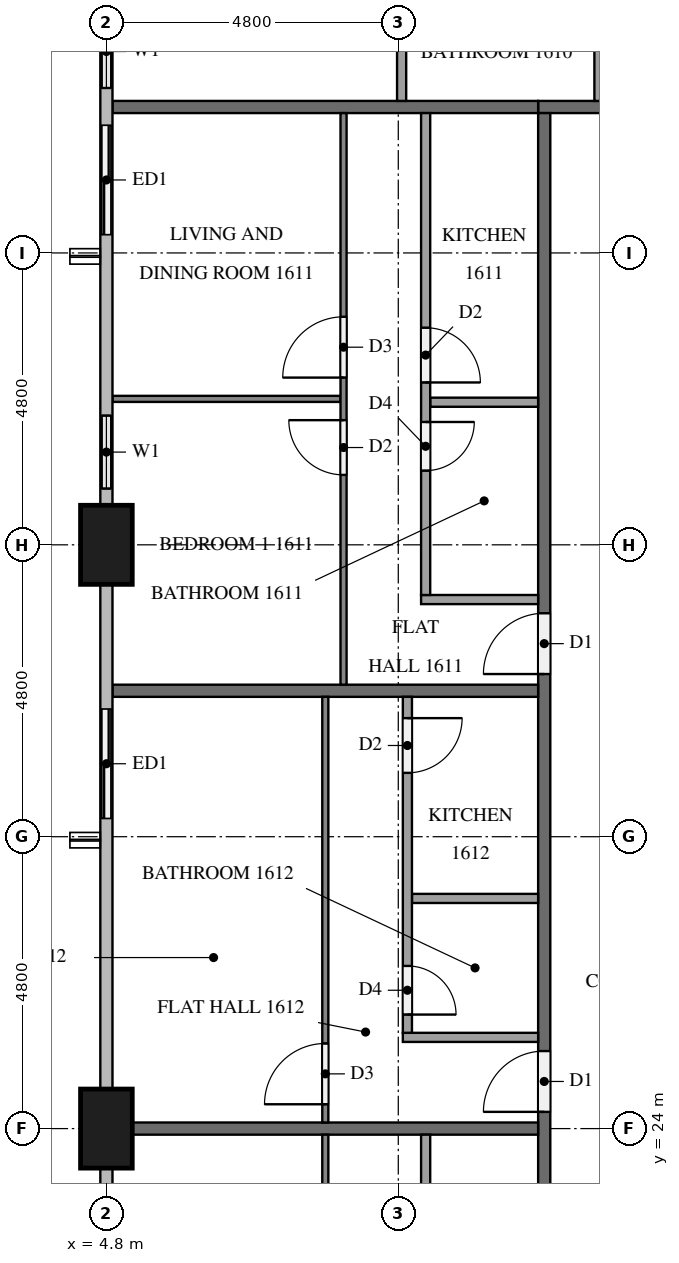
"""IFC4 building model, lengths in metres.
Left out: names, types, materials, properties, quantities, classifications, styles, units other than length and angle.
Written with IfcOpenShell. Run it as: python <this file> out.ifc"""

import sys

from ifc_helpers import new_model, si_unit, direction, frame, frame_2d, origin, origin_2d, place, context, subcontext, project, spatial, rectangle, extrude, element, fill, save


model = new_model("IFC4")
c1 = context("Model", 3, precision=1e-05, world=origin(), true_north=direction((0.0, 1.0)))
c2 = subcontext(c1, "Body", "Model", "MODEL_VIEW")
j1 = project(units=[si_unit("LENGTHUNIT", "METRE"), si_unit("PLANEANGLEUNIT", "RADIAN")], contexts=[c1])
p1 = place(None, origin())
s1 = spatial("IfcSite", under=j1, at=p1, CompositionType="ELEMENT")
p2 = place(p1, origin())
s2 = spatial("IfcBuilding", under=s1, at=p2, CompositionType="ELEMENT")
p3 = place(p2, frame((0.0, 0.0, 66.3)))
s3 = spatial("IfcBuildingStorey", under=s2, at=p3, CompositionType="ELEMENT", Elevation=66.3)
for number, where, z_axis, x_axis in (
    (1, (4.8, 33.6, 0.0), (0.0, 0.0, 1.0), (0.0, 1.0, 0.0)),
    (2, (4.8, 24.0, 0.0), (0.0, 0.0, 1.0), (0.0, 1.0, 0.0)),
):
    element("IfcColumn", number, at=place(p3, frame(where, z_axis=z_axis, x_axis=x_axis)), inside=s3, PredefinedType="COLUMN", context=c2, shape_type="SweptSolid", body=[
        extrude(rectangle(XDim=1.3, YDim=0.85, at=origin_2d()), origin(), (0.0, 0.0, 1.0), 3.2),
    ])
p4 = place(p3, frame((4.8, 42.625, 0.0), z_axis=(0.0, 0.0, 1.0), x_axis=(0.0, -1.0, 0.0)))
e3 = element("IfcWall", 3, at=p4, inside=s3, PredefinedType="SOLIDWALL", context=c2, shape_type="SweptSolid", body=[
    extrude(rectangle(XDim=4.225, YDim=0.15, at=frame_2d((2.113, 0.0))), origin(), (0.0, 0.0, 1.0), 3.2),
])
p5 = place(p4, frame((0.312, 0.0, 0.9)))
e4 = element("IfcOpeningElement", 4, at=p5, cuts=e3, PredefinedType="OPENING", context=c2, shape_type="SweptSolid", body=[
    extrude(rectangle(XDim=1.2, YDim=1.4, at=frame_2d((0.6, 0.7))), frame((0.0, 0.085, 0.0), z_axis=(0.0, -1.0, 0.0), x_axis=(1.0, 0.0, 0.0)), (0.0, 0.0, 1.0), 0.17),
])
p6 = place(p4, frame((2.125, 0.0, 0.0)))
e5 = element("IfcOpeningElement", 5, at=p6, cuts=e3, PredefinedType="OPENING", context=c2, shape_type="SweptSolid", body=[
    extrude(rectangle(XDim=1.8, YDim=2.4, at=frame_2d((0.9, 1.2))), frame((0.0, 0.085, 0.0), z_axis=(0.0, -1.0, 0.0), x_axis=(1.0, 0.0, 0.0)), (0.0, 0.0, 1.0), 0.17),
])
p7 = place(p3, frame((4.8, 36.0, 0.0), z_axis=(0.0, 0.0, 1.0), x_axis=(0.0, -1.0, 0.0)))
e6 = element("IfcWall", 6, at=p7, inside=s3, PredefinedType="SOLIDWALL", context=c2, shape_type="SweptSolid", body=[
    extrude(rectangle(XDim=1.75, YDim=0.15, at=frame_2d((0.875, 0.0))), origin(), (0.0, 0.0, 1.0), 3.2),
])
p8 = place(p7, frame((0.275, 0.0, 0.9)))
e7 = element("IfcOpeningElement", 7, at=p8, cuts=e6, PredefinedType="OPENING", context=c2, shape_type="SweptSolid", body=[
    extrude(rectangle(XDim=1.2, YDim=1.4, at=frame_2d((0.6, 0.7))), frame((0.0, 0.085, 0.0), z_axis=(0.0, -1.0, 0.0), x_axis=(1.0, 0.0, 0.0)), (0.0, 0.0, 1.0), 0.17),
])
p9 = place(p3, frame((4.8, 31.2, 0.0), z_axis=(0.0, 0.0, 1.0), x_axis=(0.0, -1.0, 0.0)))
e8 = element("IfcWall", 8, at=p9, inside=s3, PredefinedType="SOLIDWALL", context=c2, shape_type="SweptSolid", body=[
    extrude(rectangle(XDim=2.4, YDim=0.15, at=frame_2d((1.2, 0.0))), origin(), (0.0, 0.0, 1.0), 3.2),
])
p10 = place(p9, frame((0.3, 0.0, 0.0)))
e9 = element("IfcOpeningElement", 9, at=p10, cuts=e8, PredefinedType="OPENING", context=c2, shape_type="SweptSolid", body=[
    extrude(rectangle(XDim=1.8, YDim=2.4, at=frame_2d((0.9, 1.2))), frame((0.0, 0.085, 0.0), z_axis=(0.0, -1.0, 0.0), x_axis=(1.0, 0.0, 0.0)), (0.0, 0.0, 1.0), 0.17),
])
p11 = place(p3, frame((4.8, 23.35, 0.0), z_axis=(0.0, 0.0, 1.0), x_axis=(0.0, -1.0, 0.0)))
e10 = element("IfcWall", 10, at=p11, inside=s3, PredefinedType="SOLIDWALL", context=c2, shape_type="SweptSolid", body=[
    extrude(rectangle(XDim=1.75, YDim=0.15, at=frame_2d((0.875, 0.0))), origin(), (0.0, 0.0, 1.0), 3.2),
])
p12 = place(p11, frame((0.275, 0.0, 0.9)))
e11 = element("IfcOpeningElement", 11, at=p12, cuts=e10, PredefinedType="OPENING", context=c2, shape_type="SweptSolid", body=[
    extrude(rectangle(XDim=1.2, YDim=1.4, at=frame_2d((0.6, 0.7))), frame((0.0, 0.085, 0.0), z_axis=(0.0, -1.0, 0.0), x_axis=(1.0, 0.0, 0.0)), (0.0, 0.0, 1.0), 0.17),
])
p13 = place(p3, frame((11.9, 40.8, 0.0), z_axis=(0.0, 0.0, 1.0), x_axis=(1.0, 0.0, 0.0)))
e12 = element("IfcWall", 12, at=p13, inside=s3, PredefinedType="PARTITIONING", context=c2, shape_type="SweptSolid", body=[
    extrude(rectangle(XDim=38.6, YDim=0.2, at=frame_2d((19.3, 0.0))), origin(), (0.0, 0.0, 1.0), 3.2),
])
p14 = place(p13, frame((36.375, 0.0, 0.0)))
e13 = element("IfcOpeningElement", 13, at=p14, cuts=e12, PredefinedType="OPENING", context=c2, shape_type="SweptSolid", body=[
    extrude(rectangle(XDim=1.0, YDim=2.1, at=frame_2d((0.5, 1.05))), frame((0.0, 0.11, 0.0), z_axis=(0.0, -1.0, 0.0), x_axis=(1.0, 0.0, 0.0)), (0.0, 0.0, 1.0), 0.22),
])
p15 = place(p13, frame((17.125, 0.0, 0.0)))
e14 = element("IfcOpeningElement", 14, at=p15, cuts=e12, PredefinedType="OPENING", context=c2, shape_type="SweptSolid", body=[
    extrude(rectangle(XDim=1.1, YDim=2.1, at=frame_2d((0.55, 1.05))), frame((0.0, 0.11, 0.0), z_axis=(0.0, -1.0, 0.0), x_axis=(1.0, 0.0, 0.0)), (0.0, 0.0, 1.0), 0.22),
])
p16 = place(p13, frame((15.625, 0.0, 0.0)))
e15 = element("IfcOpeningElement", 15, at=p16, cuts=e12, PredefinedType="OPENING", context=c2, shape_type="SweptSolid", body=[
    extrude(rectangle(XDim=1.0, YDim=2.1, at=frame_2d((0.5, 1.05))), frame((0.0, 0.11, 0.0), z_axis=(0.0, -1.0, 0.0), x_axis=(1.0, 0.0, 0.0)), (0.0, 0.0, 1.0), 0.22),
])
p17 = place(p13, frame((1.225, 0.0, 0.0)))
e16 = element("IfcOpeningElement", 16, at=p17, cuts=e12, PredefinedType="OPENING", context=c2, shape_type="SweptSolid", body=[
    extrude(rectangle(XDim=1.0, YDim=2.1, at=frame_2d((0.5, 1.05))), frame((0.0, 0.11, 0.0), z_axis=(0.0, -1.0, 0.0), x_axis=(1.0, 0.0, 0.0)), (0.0, 0.0, 1.0), 0.22),
])
p18 = place(p3, frame((12.0, 12.1, 0.0), z_axis=(0.0, 0.0, 1.0), x_axis=(0.0, 1.0, 0.0)))
e17 = element("IfcWall", 17, at=p18, inside=s3, PredefinedType="PARTITIONING", context=c2, shape_type="SweptSolid", body=[
    extrude(rectangle(XDim=28.6, YDim=0.2, at=frame_2d((14.3, 0.0))), origin(), (0.0, 0.0, 1.0), 3.2),
])
p19 = place(p18, frame((19.375, 0.0, 0.0)))
e18 = element("IfcOpeningElement", 18, at=p19, cuts=e17, PredefinedType="OPENING", context=c2, shape_type="SweptSolid", body=[
    extrude(rectangle(XDim=1.0, YDim=2.1, at=frame_2d((0.5, 1.05))), frame((0.0, 0.11, 0.0), z_axis=(0.0, -1.0, 0.0), x_axis=(1.0, 0.0, 0.0)), (0.0, 0.0, 1.0), 0.22),
])
p20 = place(p18, frame((12.175, 0.0, 0.0)))
e19 = element("IfcOpeningElement", 19, at=p20, cuts=e17, PredefinedType="OPENING", context=c2, shape_type="SweptSolid", body=[
    extrude(rectangle(XDim=1.0, YDim=2.1, at=frame_2d((0.5, 1.05))), frame((0.0, 0.11, 0.0), z_axis=(0.0, -1.0, 0.0), x_axis=(1.0, 0.0, 0.0)), (0.0, 0.0, 1.0), 0.22),
])
p21 = place(p18, frame((2.575, 0.0, 0.0)))
e20 = element("IfcOpeningElement", 20, at=p21, cuts=e17, PredefinedType="OPENING", context=c2, shape_type="SweptSolid", body=[
    extrude(rectangle(XDim=1.0, YDim=2.1, at=frame_2d((0.5, 1.05))), frame((0.0, 0.11, 0.0), z_axis=(0.0, -1.0, 0.0), x_axis=(1.0, 0.0, 0.0)), (0.0, 0.0, 1.0), 0.22),
])
p22 = place(p18, frame((1.025, 0.0, 0.0)))
e21 = element("IfcOpeningElement", 21, at=p22, cuts=e17, PredefinedType="OPENING", context=c2, shape_type="SweptSolid", body=[
    extrude(rectangle(XDim=1.0, YDim=2.1, at=frame_2d((0.5, 1.05))), frame((0.0, 0.11, 0.0), z_axis=(0.0, -1.0, 0.0), x_axis=(1.0, 0.0, 0.0)), (0.0, 0.0, 1.0), 0.22),
])
for number, where, z_axis, x_axis in (
    (22, (4.9, 40.8, 0.0), (0.0, 0.0, 1.0), (1.0, 0.0, 0.0)),
    (23, (4.9, 31.2, 0.0), (0.0, 0.0, 1.0), (1.0, 0.0, 0.0)),
):
    element("IfcWall", number, at=place(p3, frame(where, z_axis=z_axis, x_axis=x_axis)), inside=s3, PredefinedType="PARTITIONING", context=c2, shape_type="SweptSolid", body=[
        extrude(rectangle(XDim=7.0, YDim=0.2, at=frame_2d((3.5, 0.0))), origin(), (0.0, 0.0, 1.0), 3.2),
    ])
p23 = place(p3, frame((5.225, 24.0, 0.0), z_axis=(0.0, 0.0, 1.0), x_axis=(1.0, 0.0, 0.0)))
e24 = element("IfcWall", 24, at=p23, inside=s3, PredefinedType="PARTITIONING", context=c2, shape_type="SweptSolid", body=[
    extrude(rectangle(XDim=6.675, YDim=0.2, at=frame_2d((3.337, 0.0))), origin(), (0.0, 0.0, 1.0), 3.2),
])
p24 = place(p3, frame((9.655, 40.9, 0.0), z_axis=(0.0, 0.0, 1.0), x_axis=(0.0, 1.0, 0.0)))
e25 = element("IfcWall", 25, at=p24, inside=s3, PredefinedType="PARTITIONING", context=c2, shape_type="SweptSolid", body=[
    extrude(rectangle(XDim=1.775, YDim=0.15, at=frame_2d((0.888, 0.0))), origin(), (0.0, 0.0, 1.0), 3.2),
])
p25 = place(p3, frame((12.9, 40.9, 0.0), z_axis=(0.0, 0.0, 1.0), x_axis=(0.0, 1.0, 0.0)))
e26 = element("IfcWall", 26, at=p25, inside=s3, PredefinedType="PARTITIONING", context=c2, shape_type="SweptSolid", body=[
    extrude(rectangle(XDim=1.925, YDim=0.15, at=frame_2d((0.962, 0.0))), origin(), (0.0, 0.0, 1.0), 3.2),
])
p26 = place(p3, frame((8.65, 36.0, 0.0), z_axis=(0.0, 0.0, 1.0), x_axis=(-1.0, 0.0, 0.0)))
e27 = element("IfcWall", 27, at=p26, inside=s3, PredefinedType="PARTITIONING", context=c2, shape_type="SweptSolid", body=[
    extrude(rectangle(XDim=3.75, YDim=0.1, at=frame_2d((1.875, 0.0))), origin(), (0.0, 0.0, 1.0), 3.2),
])
p27 = place(p3, frame((8.7, 31.3, 0.0), z_axis=(0.0, 0.0, 1.0), x_axis=(0.0, 1.0, 0.0)))
e28 = element("IfcWall", 28, at=p27, inside=s3, PredefinedType="PARTITIONING", context=c2, shape_type="SweptSolid", body=[
    extrude(rectangle(XDim=9.4, YDim=0.1, at=frame_2d((4.7, 0.0))), origin(), (0.0, 0.0, 1.0), 3.2),
])
p28 = place(p27, frame((3.45, 0.0, 0.0)))
e29 = element("IfcOpeningElement", 29, at=p28, cuts=e28, PredefinedType="OPENING", context=c2, shape_type="SweptSolid", body=[
    extrude(rectangle(XDim=0.9, YDim=2.1, at=frame_2d((0.45, 1.05))), frame((0.0, 0.06, 0.0), z_axis=(0.0, -1.0, 0.0), x_axis=(1.0, 0.0, 0.0)), (0.0, 0.0, 1.0), 0.12),
])
p29 = place(p27, frame((5.05, 0.0, 0.0)))
e30 = element("IfcOpeningElement", 30, at=p29, cuts=e28, PredefinedType="OPENING", context=c2, shape_type="SweptSolid", body=[
    extrude(rectangle(XDim=1.0, YDim=2.1, at=frame_2d((0.5, 1.05))), frame((0.0, 0.06, 0.0), z_axis=(0.0, -1.0, 0.0), x_axis=(1.0, 0.0, 0.0)), (0.0, 0.0, 1.0), 0.12),
])
p30 = place(p3, frame((11.9, 35.945, 0.0), z_axis=(0.0, 0.0, 1.0), x_axis=(-1.0, 0.0, 0.0)))
e31 = element("IfcWall", 31, at=p30, inside=s3, PredefinedType="PARTITIONING", context=c2, shape_type="SweptSolid", body=[
    extrude(rectangle(XDim=1.775, YDim=0.15, at=frame_2d((0.887, 0.0))), origin(), (0.0, 0.0, 1.0), 3.2),
])
p31 = place(p3, frame((11.9, 32.7, 0.0), z_axis=(0.0, 0.0, 1.0), x_axis=(-1.0, 0.0, 0.0)))
e32 = element("IfcWall", 32, at=p31, inside=s3, PredefinedType="PARTITIONING", context=c2, shape_type="SweptSolid", body=[
    extrude(rectangle(XDim=1.925, YDim=0.15, at=frame_2d((0.962, 0.0))), origin(), (0.0, 0.0, 1.0), 3.2),
])
p32 = place(p3, frame((10.05, 40.7, 0.0), z_axis=(0.0, 0.0, 1.0), x_axis=(0.0, -1.0, 0.0)))
e33 = element("IfcWall", 33, at=p32, inside=s3, PredefinedType="PARTITIONING", context=c2, shape_type="SweptSolid", body=[
    extrude(rectangle(XDim=7.925, YDim=0.15, at=frame_2d((3.962, 0.0))), origin(), (0.0, 0.0, 1.0), 3.2),
])
p33 = place(p32, frame((5.08, 0.0, 0.0)))
e34 = element("IfcOpeningElement", 34, at=p33, cuts=e33, PredefinedType="OPENING", context=c2, shape_type="SweptSolid", body=[
    extrude(rectangle(XDim=0.8, YDim=2.1, at=frame_2d((0.4, 1.05))), frame((0.0, 0.085, 0.0), z_axis=(0.0, -1.0, 0.0), x_axis=(1.0, 0.0, 0.0)), (0.0, 0.0, 1.0), 0.17),
])
p34 = place(p32, frame((3.53, 0.0, 0.0)))
e35 = element("IfcOpeningElement", 35, at=p34, cuts=e33, PredefinedType="OPENING", context=c2, shape_type="SweptSolid", body=[
    extrude(rectangle(XDim=0.9, YDim=2.1, at=frame_2d((0.45, 1.05))), frame((0.0, 0.085, 0.0), z_axis=(0.0, -1.0, 0.0), x_axis=(1.0, 0.0, 0.0)), (0.0, 0.0, 1.0), 0.17),
])
p35 = place(p3, frame((8.4, 24.1, 0.0), z_axis=(0.0, 0.0, 1.0), x_axis=(0.0, 1.0, 0.0)))
e36 = element("IfcWall", 36, at=p35, inside=s3, PredefinedType="PARTITIONING", context=c2, shape_type="SweptSolid", body=[
    extrude(rectangle(XDim=7.0, YDim=0.1, at=frame_2d((3.5, 0.0))), origin(), (0.0, 0.0, 1.0), 3.2),
])
p36 = place(p35, frame((0.3, 0.0, 0.0)))
e37 = element("IfcOpeningElement", 37, at=p36, cuts=e36, PredefinedType="OPENING", context=c2, shape_type="SweptSolid", body=[
    extrude(rectangle(XDim=1.0, YDim=2.1, at=frame_2d((0.5, 1.05))), frame((0.0, 0.06, 0.0), z_axis=(0.0, -1.0, 0.0), x_axis=(1.0, 0.0, 0.0)), (0.0, 0.0, 1.0), 0.12),
])
p37 = place(p3, frame((11.9, 27.785, 0.0), z_axis=(0.0, 0.0, 1.0), x_axis=(-1.0, 0.0, 0.0)))
e38 = element("IfcWall", 38, at=p37, inside=s3, PredefinedType="PARTITIONING", context=c2, shape_type="SweptSolid", body=[
    extrude(rectangle(XDim=2.075, YDim=0.15, at=frame_2d((1.038, 0.0))), origin(), (0.0, 0.0, 1.0), 3.2),
])
p38 = place(p3, frame((11.9, 25.5, 0.0), z_axis=(0.0, 0.0, 1.0), x_axis=(-1.0, 0.0, 0.0)))
e39 = element("IfcWall", 39, at=p38, inside=s3, PredefinedType="PARTITIONING", context=c2, shape_type="SweptSolid", body=[
    extrude(rectangle(XDim=2.225, YDim=0.15, at=frame_2d((1.112, 0.0))), origin(), (0.0, 0.0, 1.0), 3.2),
])
p39 = place(p3, frame((9.75, 31.1, 0.0), z_axis=(0.0, 0.0, 1.0), x_axis=(0.0, -1.0, 0.0)))
e40 = element("IfcWall", 40, at=p39, inside=s3, PredefinedType="PARTITIONING", context=c2, shape_type="SweptSolid", body=[
    extrude(rectangle(XDim=5.525, YDim=0.15, at=frame_2d((2.763, 0.0))), origin(), (0.0, 0.0, 1.0), 3.2),
])
p40 = place(p39, frame((4.425, 0.0, 0.0)))
e41 = element("IfcOpeningElement", 41, at=p40, cuts=e40, PredefinedType="OPENING", context=c2, shape_type="SweptSolid", body=[
    extrude(rectangle(XDim=0.8, YDim=2.1, at=frame_2d((0.4, 1.05))), frame((0.0, 0.085, 0.0), z_axis=(0.0, -1.0, 0.0), x_axis=(1.0, 0.0, 0.0)), (0.0, 0.0, 1.0), 0.17),
])
p41 = place(p39, frame((0.35, 0.0, 0.0)))
e42 = element("IfcOpeningElement", 42, at=p41, cuts=e40, PredefinedType="OPENING", context=c2, shape_type="SweptSolid", body=[
    extrude(rectangle(XDim=0.9, YDim=2.1, at=frame_2d((0.45, 1.05))), frame((0.0, 0.085, 0.0), z_axis=(0.0, -1.0, 0.0), x_axis=(1.0, 0.0, 0.0)), (0.0, 0.0, 1.0), 0.17),
])
p42 = place(p3, frame((8.4, 14.5, 0.0), z_axis=(0.0, 0.0, 1.0), x_axis=(0.0, 1.0, 0.0)))
e43 = element("IfcWall", 43, at=p42, inside=s3, PredefinedType="PARTITIONING", context=c2, shape_type="SweptSolid", body=[
    extrude(rectangle(XDim=9.4, YDim=0.1, at=frame_2d((4.7, 0.0))), origin(), (0.0, 0.0, 1.0), 3.2),
])
p43 = place(p42, frame((3.35, 0.0, 0.0)))
e44 = element("IfcOpeningElement", 44, at=p43, cuts=e43, PredefinedType="OPENING", context=c2, shape_type="SweptSolid", body=[
    extrude(rectangle(XDim=1.0, YDim=2.1, at=frame_2d((0.5, 1.05))), frame((0.0, 0.06, 0.0), z_axis=(0.0, -1.0, 0.0), x_axis=(1.0, 0.0, 0.0)), (0.0, 0.0, 1.0), 0.12),
])
p44 = place(p42, frame((5.05, 0.0, 0.0)))
e45 = element("IfcOpeningElement", 45, at=p44, cuts=e43, PredefinedType="OPENING", context=c2, shape_type="SweptSolid", body=[
    extrude(rectangle(XDim=0.9, YDim=2.1, at=frame_2d((0.45, 1.05))), frame((0.0, 0.06, 0.0), z_axis=(0.0, -1.0, 0.0), x_axis=(1.0, 0.0, 0.0)), (0.0, 0.0, 1.0), 0.12),
])
p45 = place(p3, frame((10.05, 23.9, 0.0), z_axis=(0.0, 0.0, 1.0), x_axis=(0.0, -1.0, 0.0)))
e46 = element("IfcWall", 46, at=p45, inside=s3, PredefinedType="PARTITIONING", context=c2, shape_type="SweptSolid", body=[
    extrude(rectangle(XDim=7.925, YDim=0.15, at=frame_2d((3.962, 0.0))), origin(), (0.0, 0.0, 1.0), 3.2),
])
p46 = place(p45, frame((5.08, 0.0, 0.0)))
e47 = element("IfcOpeningElement", 47, at=p46, cuts=e46, PredefinedType="OPENING", context=c2, shape_type="SweptSolid", body=[
    extrude(rectangle(XDim=0.8, YDim=2.1, at=frame_2d((0.4, 1.05))), frame((0.0, 0.085, 0.0), z_axis=(0.0, -1.0, 0.0), x_axis=(1.0, 0.0, 0.0)), (0.0, 0.0, 1.0), 0.17),
])
p47 = place(p45, frame((3.53, 0.0, 0.0)))
e48 = element("IfcOpeningElement", 48, at=p47, cuts=e46, PredefinedType="OPENING", context=c2, shape_type="SweptSolid", body=[
    extrude(rectangle(XDim=0.9, YDim=2.1, at=frame_2d((0.45, 1.05))), frame((0.0, 0.085, 0.0), z_axis=(0.0, -1.0, 0.0), x_axis=(1.0, 0.0, 0.0)), (0.0, 0.0, 1.0), 0.17),
])
p48 = place(p5, origin())
e49 = element("IfcWindow", 49, at=p48, inside=s3, PartitioningType="SINGLE_PANEL", PredefinedType="WINDOW", context=c2, shape_type="SweptSolid", body=[
    extrude(rectangle(XDim=1.2, YDim=1.4, at=frame_2d((0.6, 0.7))), frame((0.0, 0.03, 0.0), z_axis=(0.0, -1.0, 0.0), x_axis=(1.0, 0.0, 0.0)), (0.0, 0.0, 1.0), 0.06),
])
fill(e4, e49)
p49 = place(p6, origin())
e50 = element("IfcDoor", 50, at=p49, inside=s3, OperationType="SLIDING_TO_RIGHT", PredefinedType="DOOR", context=c2, shape_type="SweptSolid", body=[
    extrude(rectangle(XDim=1.8, YDim=2.4, at=frame_2d((0.9, 1.2))), frame((0.0, 0.025, 0.0), z_axis=(0.0, -1.0, 0.0), x_axis=(1.0, 0.0, 0.0)), (0.0, 0.0, 1.0), 0.05),
])
fill(e5, e50)
p50 = place(p8, origin())
e51 = element("IfcWindow", 51, at=p50, inside=s3, PartitioningType="SINGLE_PANEL", PredefinedType="WINDOW", context=c2, shape_type="SweptSolid", body=[
    extrude(rectangle(XDim=1.2, YDim=1.4, at=frame_2d((0.6, 0.7))), frame((0.0, 0.03, 0.0), z_axis=(0.0, -1.0, 0.0), x_axis=(1.0, 0.0, 0.0)), (0.0, 0.0, 1.0), 0.06),
])
fill(e7, e51)
p51 = place(p10, origin())
e52 = element("IfcDoor", 52, at=p51, inside=s3, OperationType="SLIDING_TO_LEFT", PredefinedType="DOOR", context=c2, shape_type="SweptSolid", body=[
    extrude(rectangle(XDim=1.8, YDim=2.4, at=frame_2d((0.9, 1.2))), frame((0.0, 0.025, 0.0), z_axis=(0.0, -1.0, 0.0), x_axis=(1.0, 0.0, 0.0)), (0.0, 0.0, 1.0), 0.05),
])
fill(e9, e52)
p52 = place(p19, origin())
e53 = element("IfcDoor", 53, at=p52, inside=s3, OperationType="SINGLE_SWING_LEFT", PredefinedType="DOOR", context=c2, shape_type="SweptSolid", body=[
    extrude(rectangle(XDim=1.0, YDim=2.1, at=frame_2d((0.5, 1.05))), frame((0.0, 0.025, 0.0), z_axis=(0.0, -1.0, 0.0), x_axis=(1.0, 0.0, 0.0)), (0.0, 0.0, 1.0), 0.05),
])
fill(e18, e53)
p53 = place(p20, origin())
e54 = element("IfcDoor", 54, at=p53, inside=s3, OperationType="SINGLE_SWING_LEFT", PredefinedType="DOOR", context=c2, shape_type="SweptSolid", body=[
    extrude(rectangle(XDim=1.0, YDim=2.1, at=frame_2d((0.5, 1.05))), frame((0.0, 0.025, 0.0), z_axis=(0.0, -1.0, 0.0), x_axis=(1.0, 0.0, 0.0)), (0.0, 0.0, 1.0), 0.05),
])
fill(e19, e54)
p54 = place(p28, origin())
e55 = element("IfcDoor", 55, at=p54, inside=s3, OperationType="SINGLE_SWING_RIGHT", PredefinedType="DOOR", context=c2, shape_type="SweptSolid", body=[
    extrude(rectangle(XDim=0.9, YDim=2.1, at=frame_2d((0.45, 1.05))), frame((0.0, 0.025, 0.0), z_axis=(0.0, -1.0, 0.0), x_axis=(1.0, 0.0, 0.0)), (0.0, 0.0, 1.0), 0.05),
])
fill(e29, e55)
p55 = place(p29, origin())
e56 = element("IfcDoor", 56, at=p55, inside=s3, OperationType="SINGLE_SWING_LEFT", PredefinedType="DOOR", context=c2, shape_type="SweptSolid", body=[
    extrude(rectangle(XDim=1.0, YDim=2.1, at=frame_2d((0.5, 1.05))), frame((0.0, 0.025, 0.0), z_axis=(0.0, -1.0, 0.0), x_axis=(1.0, 0.0, 0.0)), (0.0, 0.0, 1.0), 0.05),
])
fill(e30, e56)
p56 = place(p33, origin())
e57 = element("IfcDoor", 57, at=p56, inside=s3, OperationType="SINGLE_SWING_LEFT", PredefinedType="DOOR", context=c2, shape_type="SweptSolid", body=[
    extrude(rectangle(XDim=0.8, YDim=2.1, at=frame_2d((0.4, 1.05))), frame((0.0, 0.025, 0.0), z_axis=(0.0, -1.0, 0.0), x_axis=(1.0, 0.0, 0.0)), (0.0, 0.0, 1.0), 0.05),
])
fill(e34, e57)
p57 = place(p34, origin())
e58 = element("IfcDoor", 58, at=p57, inside=s3, OperationType="SINGLE_SWING_RIGHT", PredefinedType="DOOR", context=c2, shape_type="SweptSolid", body=[
    extrude(rectangle(XDim=0.9, YDim=2.1, at=frame_2d((0.45, 1.05))), frame((0.0, 0.025, 0.0), z_axis=(0.0, -1.0, 0.0), x_axis=(1.0, 0.0, 0.0)), (0.0, 0.0, 1.0), 0.05),
])
fill(e35, e58)
p58 = place(p36, origin())
e59 = element("IfcDoor", 59, at=p58, inside=s3, OperationType="SINGLE_SWING_LEFT", PredefinedType="DOOR", context=c2, shape_type="SweptSolid", body=[
    extrude(rectangle(XDim=1.0, YDim=2.1, at=frame_2d((0.5, 1.05))), frame((0.0, 0.025, 0.0), z_axis=(0.0, -1.0, 0.0), x_axis=(1.0, 0.0, 0.0)), (0.0, 0.0, 1.0), 0.05),
])
fill(e37, e59)
p59 = place(p40, origin())
e60 = element("IfcDoor", 60, at=p59, inside=s3, OperationType="SINGLE_SWING_RIGHT", PredefinedType="DOOR", context=c2, shape_type="SweptSolid", body=[
    extrude(rectangle(XDim=0.8, YDim=2.1, at=frame_2d((0.4, 1.05))), frame((0.0, 0.025, 0.0), z_axis=(0.0, -1.0, 0.0), x_axis=(1.0, 0.0, 0.0)), (0.0, 0.0, 1.0), 0.05),
])
fill(e41, e60)
p60 = place(p41, origin())
e61 = element("IfcDoor", 61, at=p60, inside=s3, OperationType="SINGLE_SWING_LEFT", PredefinedType="DOOR", context=c2, shape_type="SweptSolid", body=[
    extrude(rectangle(XDim=0.9, YDim=2.1, at=frame_2d((0.45, 1.05))), frame((0.0, 0.025, 0.0), z_axis=(0.0, -1.0, 0.0), x_axis=(1.0, 0.0, 0.0)), (0.0, 0.0, 1.0), 0.05),
])
fill(e42, e61)
save(model, sys.argv[1])
